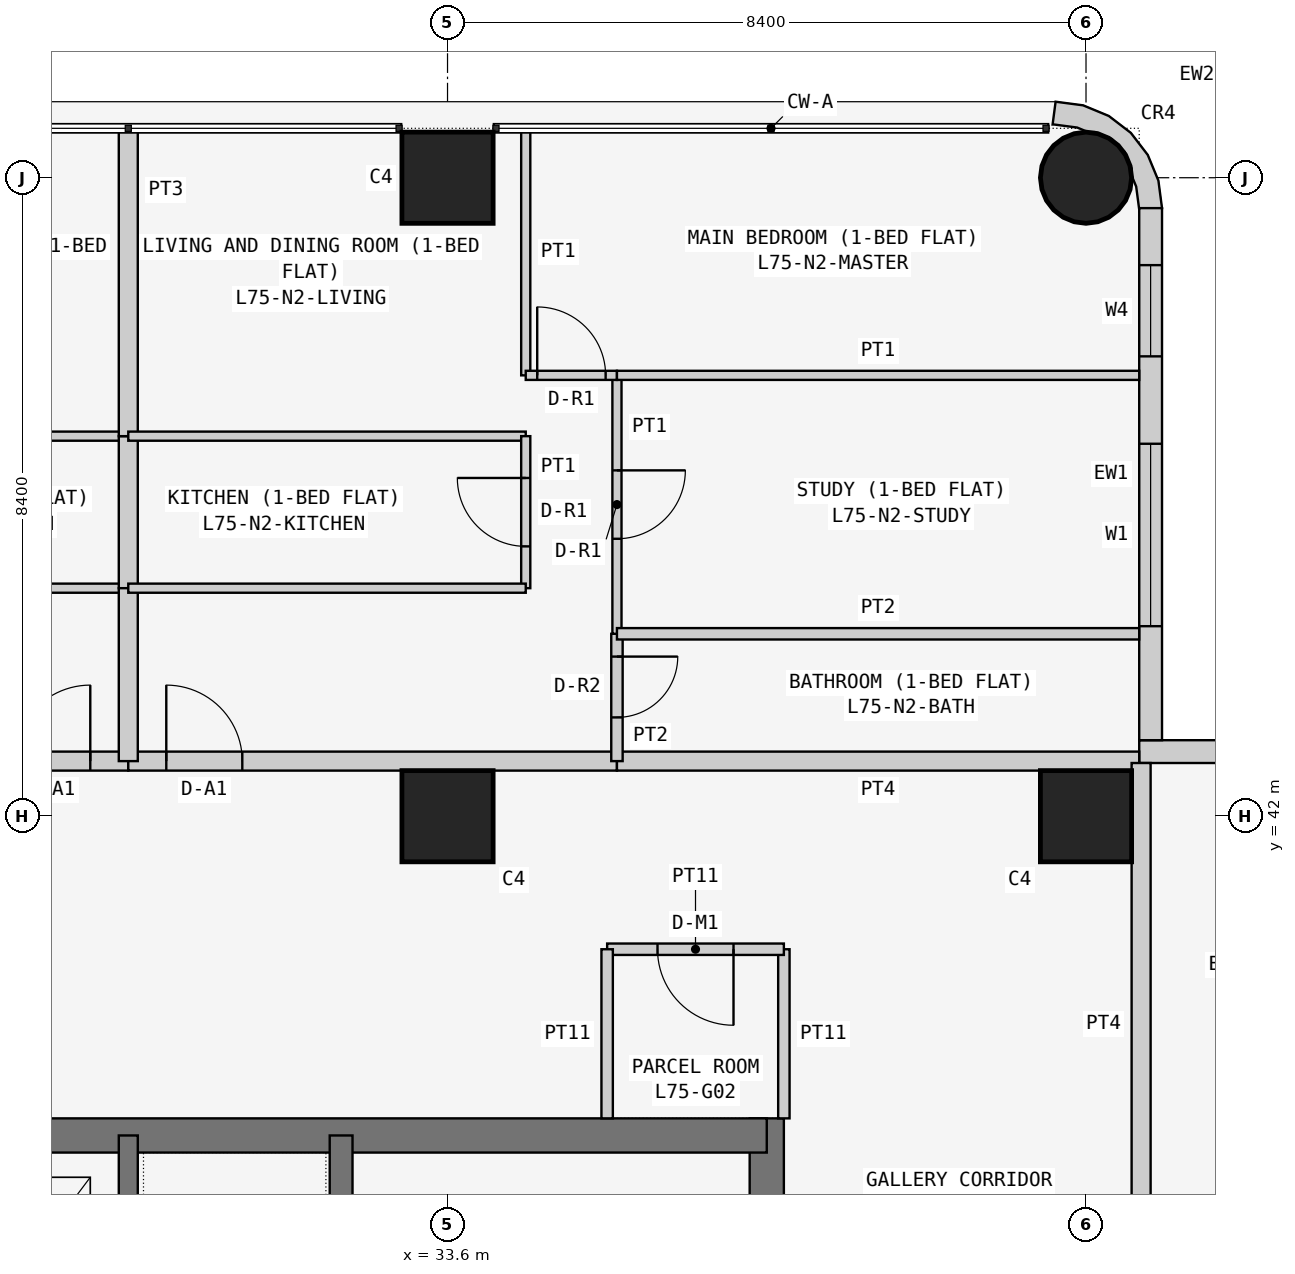
"""IFC4 building model, lengths in metres.
Left out: names, types, materials, properties, quantities, classifications, styles, units other than length and angle.
Written with IfcOpenShell. Run it as: python <this file> out.ifc"""

import sys

from ifc_helpers import new_model, si_unit, direction, frame, frame_2d, origin, origin_2d, place, context, subcontext, project, spatial, polyline, rectangle, circle, outline, extrude, element, fill, save


model = new_model("IFC4")
c1 = context("Model", 3, precision=1e-05, world=origin(), true_north=direction((0.0, 1.0)))
c2 = subcontext(c1, "Body", "Model", "MODEL_VIEW")
j1 = project(units=[si_unit("LENGTHUNIT", "METRE"), si_unit("PLANEANGLEUNIT", "RADIAN")], contexts=[c1])
p1 = place(None, origin())
s1 = spatial("IfcSite", under=j1, at=p1, CompositionType="ELEMENT")
p2 = place(p1, origin())
s2 = spatial("IfcBuilding", under=s1, at=p2, CompositionType="ELEMENT")
p3 = place(p2, frame((0.0, 0.0, 286.5)))
s3 = spatial("IfcBuildingStorey", under=s2, at=p3, CompositionType="ELEMENT", Elevation=286.5)
for number, where, z_axis, x_axis in (
    (1, (33.6, 42.0, 0.0), (0.0, 0.0, 1.0), (1.0, 0.0, 0.0)),
    (2, (33.6, 50.4, 0.0), (0.0, 0.0, 1.0), (1.0, 0.0, 0.0)),
    (3, (42.0, 42.0, 0.0), (0.0, 0.0, 1.0), (1.0, 0.0, 0.0)),
):
    element("IfcColumn", number, at=place(p3, frame(where, z_axis=z_axis, x_axis=x_axis)), inside=s3, PredefinedType="COLUMN", context=c2, shape_type="SweptSolid", body=[
        extrude(rectangle(XDim=1.2, YDim=1.2, at=origin_2d()), origin(), (0.0, 0.0, 1.0), 3.6),
    ])
p4 = place(p3, frame((42.0, 50.4, 0.0), z_axis=(0.0, 0.0, 1.0), x_axis=(1.0, 0.0, 0.0)))
e4 = element("IfcColumn", 4, at=p4, inside=s3, PredefinedType="COLUMN", context=c2, shape_type="SweptSolid", body=[
    extrude(circle(Radius=0.6, at=origin_2d()), origin(), (0.0, 0.0, 1.0), 3.6),
])
p5 = place(p3, frame((37.8, 21.0, 0.0), z_axis=(0.0, 0.0, 1.0), x_axis=(0.0, 1.0, 0.0)))
e5 = element("IfcWall", 5, at=p5, inside=s3, PredefinedType="SHEAR", context=c2, shape_type="SweptSolid", body=[
    extrude(rectangle(XDim=17.025, YDim=0.45, at=frame_2d((8.512, 0.0))), origin(), (0.0, 0.0, 1.0), 3.6),
])
p6 = place(p5, frame((5.2, 0.0, 0.0)))
e6 = element("IfcOpeningElement", 6, at=p6, cuts=e5, PredefinedType="OPENING", context=c2, shape_type="SweptSolid", body=[
    extrude(rectangle(XDim=1.2, YDim=2.1, at=frame_2d((0.6, 1.05))), frame((0.0, 0.235, 0.0), z_axis=(0.0, -1.0, 0.0), x_axis=(1.0, 0.0, 0.0)), (0.0, 0.0, 1.0), 0.47),
])
p7 = place(p3, frame((37.8, 37.8, 0.0), z_axis=(0.0, 0.0, 1.0), x_axis=(-1.0, 0.0, 0.0)))
e7 = element("IfcWall", 7, at=p7, inside=s3, PredefinedType="SHEAR", context=c2, shape_type="SweptSolid", body=[
    extrude(rectangle(XDim=17.025, YDim=0.45, at=frame_2d((8.513, 0.0))), origin(), (0.0, 0.0, 1.0), 3.6),
])
p8 = place(p3, frame((32.2, 29.25, 0.0), z_axis=(0.0, 0.0, 1.0), x_axis=(0.0, 1.0, 0.0)))
e8 = element("IfcWall", 8, at=p8, inside=s3, PredefinedType="SHEAR", context=c2, shape_type="SweptSolid", body=[
    extrude(rectangle(XDim=8.55, YDim=0.3, at=frame_2d((4.275, 0.0))), origin(), (0.0, 0.0, 1.0), 3.6),
])
p9 = place(p3, frame((29.4, 34.6, 0.0), z_axis=(0.0, 0.0, 1.0), x_axis=(0.0, 1.0, 0.0)))
e9 = element("IfcWall", 9, at=p9, inside=s3, PredefinedType="SHEAR", context=c2, shape_type="SweptSolid", body=[
    extrude(rectangle(XDim=3.2, YDim=0.25, at=frame_2d((1.6, 0.0))), origin(), (0.0, 0.0, 1.0), 3.6),
])
p10 = place(p3, frame((50.0, 42.85, 0.0), z_axis=(0.0, 0.0, 1.0), x_axis=(-1.0, 0.0, 0.0)))
e10 = element("IfcWall", 10, at=p10, inside=s3, PredefinedType="SOLIDWALL", context=c2, shape_type="SweptSolid", body=[
    extrude(rectangle(XDim=7.3, YDim=0.3, at=frame_2d((3.65, 0.0))), origin(), (0.0, 0.0, 1.0), 3.45),
])
p11 = place(p10, frame((3.1, 0.0, 0.9)))
e11 = element("IfcOpeningElement", 11, at=p11, cuts=e10, PredefinedType="OPENING", context=c2, shape_type="SweptSolid", body=[
    extrude(rectangle(XDim=2.4, YDim=1.5, at=frame_2d((1.2, 0.75))), frame((0.0, 0.16, 0.0), z_axis=(0.0, -1.0, 0.0), x_axis=(1.0, 0.0, 0.0)), (0.0, 0.0, 1.0), 0.32),
])
p12 = place(p10, frame((0.75, 0.0, 0.9)))
e12 = element("IfcOpeningElement", 12, at=p12, cuts=e10, PredefinedType="OPENING", context=c2, shape_type="SweptSolid", body=[
    extrude(rectangle(XDim=1.2, YDim=1.5, at=frame_2d((0.6, 0.75))), frame((0.0, 0.16, 0.0), z_axis=(0.0, -1.0, 0.0), x_axis=(1.0, 0.0, 0.0)), (0.0, 0.0, 1.0), 0.32),
])
p13 = place(p3, frame((42.85, 43.0, 0.0), z_axis=(0.0, 0.0, 1.0), x_axis=(0.0, 1.0, 0.0)))
e13 = element("IfcWall", 13, at=p13, inside=s3, PredefinedType="SOLIDWALL", context=c2, shape_type="SweptSolid", body=[
    extrude(rectangle(XDim=7.0, YDim=0.3, at=frame_2d((3.5, 0.0))), origin(), (0.0, 0.0, 1.0), 3.45),
])
p14 = place(p13, frame((1.5, 0.0, 0.9)))
e14 = element("IfcOpeningElement", 14, at=p14, cuts=e13, PredefinedType="OPENING", context=c2, shape_type="SweptSolid", body=[
    extrude(rectangle(XDim=2.4, YDim=1.5, at=frame_2d((1.2, 0.75))), frame((0.0, 0.16, 0.0), z_axis=(0.0, -1.0, 0.0), x_axis=(1.0, 0.0, 0.0)), (0.0, 0.0, 1.0), 0.32),
])
p15 = place(p13, frame((5.05, 0.0, 0.9)))
e15 = element("IfcOpeningElement", 15, at=p15, cuts=e13, PredefinedType="OPENING", context=c2, shape_type="SweptSolid", body=[
    extrude(rectangle(XDim=1.2, YDim=1.5, at=frame_2d((0.6, 0.75))), frame((0.0, 0.16, 0.0), z_axis=(0.0, -1.0, 0.0), x_axis=(1.0, 0.0, 0.0)), (0.0, 0.0, 1.0), 0.32),
])
p16 = place(p3, frame((42.576, 50.038, 0.0), z_axis=(0.0, 0.0, 1.0), x_axis=(0.707106781187, 0.707106781187, 0.0)))
e16 = element("IfcWall", 16, at=p16, inside=s3, PredefinedType="SOLIDWALL", context=c2, shape_type="SweptSolid", body=[
    extrude(outline(polyline([(0.233, 0.114), (0.047, -0.129), (0.033, -0.143), (0.273, -0.327), (0.495, -0.037), (0.635, 0.3), (0.683, 0.663), (0.635, 1.025), (0.495, 1.363), (0.273, 1.653), (0.033, 1.469), (0.047, 1.455), (0.233, 1.212), (0.292, 1.069), (0.358, 1.003), (0.449, 0.782), (0.449, 0.543), (0.358, 0.322), (0.292, 0.257), (0.233, 0.114)])), origin(), (0.0, 0.0, 1.0), 3.45),
])
p17 = place(p3, frame((38.025, 38.025, 0.0), z_axis=(0.0, 0.0, 1.0), x_axis=(0.0, 1.0, 0.0)))
e17 = element("IfcWall", 17, at=p17, inside=s3, PredefinedType="PARTITIONING", context=c2, shape_type="SweptSolid", body=[
    extrude(rectangle(XDim=2.225, YDim=0.15, at=frame_2d((1.113, 0.0))), origin(), (0.0, 0.0, 1.0), 3.45),
])
p18 = place(p3, frame((38.025, 40.25, 0.0), z_axis=(0.0, 0.0, 1.0), x_axis=(-1.0, 0.0, 0.0)))
e18 = element("IfcWall", 18, at=p18, inside=s3, PredefinedType="PARTITIONING", context=c2, shape_type="SweptSolid", body=[
    extrude(rectangle(XDim=2.325, YDim=0.15, at=frame_2d((1.163, 0.0))), origin(), (0.0, 0.0, 1.0), 3.45),
])
p19 = place(p18, frame((0.663, 0.0, 0.0)))
e19 = element("IfcOpeningElement", 19, at=p19, cuts=e18, PredefinedType="OPENING", context=c2, shape_type="SweptSolid", body=[
    extrude(rectangle(XDim=1.0, YDim=2.1, at=frame_2d((0.5, 1.05))), frame((0.0, 0.085, 0.0), z_axis=(0.0, -1.0, 0.0), x_axis=(1.0, 0.0, 0.0)), (0.0, 0.0, 1.0), 0.17),
])
p20 = place(p3, frame((35.7, 40.25, 0.0), z_axis=(0.0, 0.0, 1.0), x_axis=(0.0, -1.0, 0.0)))
e20 = element("IfcWall", 20, at=p20, inside=s3, PredefinedType="PARTITIONING", context=c2, shape_type="SweptSolid", body=[
    extrude(rectangle(XDim=2.225, YDim=0.15, at=frame_2d((1.113, 0.0))), origin(), (0.0, 0.0, 1.0), 3.45),
])
p21 = place(p3, frame((22.971, 42.725, 0.0), z_axis=(0.0, 0.0, 1.0), x_axis=(1.0, 0.0, 0.0)))
e21 = element("IfcWall", 21, at=p21, inside=s3, PredefinedType="PARTITIONING", context=c2, shape_type="SweptSolid", body=[
    extrude(rectangle(XDim=6.429, YDim=0.25, at=frame_2d((3.214, 0.0))), origin(), (0.0, 0.0, 1.0), 3.45),
])
p22 = place(p21, frame((4.929, 0.0, 0.0)))
e22 = element("IfcOpeningElement", 22, at=p22, cuts=e21, PredefinedType="OPENING", context=c2, shape_type="SweptSolid", body=[
    extrude(rectangle(XDim=1.0, YDim=2.1, at=frame_2d((0.5, 1.05))), frame((0.0, 0.135, 0.0), z_axis=(0.0, -1.0, 0.0), x_axis=(1.0, 0.0, 0.0)), (0.0, 0.0, 1.0), 0.27),
])
p23 = place(p3, frame((29.4, 42.725, 0.0), z_axis=(0.0, 0.0, 1.0), x_axis=(1.0, 0.0, 0.0)))
e23 = element("IfcWall", 23, at=p23, inside=s3, PredefinedType="PARTITIONING", context=c2, shape_type="SweptSolid", body=[
    extrude(rectangle(XDim=6.429, YDim=0.25, at=frame_2d((3.215, 0.0))), origin(), (0.0, 0.0, 1.0), 3.45),
])
p24 = place(p23, frame((0.5, 0.0, 0.0)))
e24 = element("IfcOpeningElement", 24, at=p24, cuts=e23, PredefinedType="OPENING", context=c2, shape_type="SweptSolid", body=[
    extrude(rectangle(XDim=1.0, YDim=2.1, at=frame_2d((0.5, 1.05))), frame((0.0, 0.135, 0.0), z_axis=(0.0, -1.0, 0.0), x_axis=(1.0, 0.0, 0.0)), (0.0, 0.0, 1.0), 0.27),
])
for number, where, z_axis, x_axis in (
    (25, (35.829, 42.725, 0.0), (0.0, 0.0, 1.0), (1.0, 0.0, 0.0)),
    (26, (42.725, 42.7, 0.0), (0.0, 0.0, 1.0), (0.0, -1.0, 0.0)),
):
    element("IfcWall", number, at=place(p3, frame(where, z_axis=z_axis, x_axis=x_axis)), inside=s3, PredefinedType="PARTITIONING", context=c2, shape_type="SweptSolid", body=[
        extrude(rectangle(XDim=6.871, YDim=0.25, at=frame_2d((3.436, 0.0))), origin(), (0.0, 0.0, 1.0), 3.45),
    ])
for number, where, z_axis, x_axis in (
    (27, (29.4, 47.0, 0.0), (0.0, 0.0, 1.0), (-1.0, 0.0, 0.0)),
    (28, (24.171, 45.0, 0.0), (0.0, 0.0, 1.0), (1.0, 0.0, 0.0)),
):
    element("IfcWall", number, at=place(p3, frame(where, z_axis=z_axis, x_axis=x_axis)), inside=s3, PredefinedType="PARTITIONING", context=c2, shape_type="SweptSolid", body=[
        extrude(rectangle(XDim=5.229, YDim=0.12, at=frame_2d((2.615, 0.0))), origin(), (0.0, 0.0, 1.0), 3.45),
    ])
p25 = place(p3, frame((29.4, 45.0, 0.0), z_axis=(0.0, 0.0, 1.0), x_axis=(0.0, 1.0, 0.0)))
e29 = element("IfcWall", 29, at=p25, inside=s3, PredefinedType="PARTITIONING", context=c2, shape_type="SweptSolid", body=[
    extrude(rectangle(XDim=2.0, YDim=0.25, at=frame_2d((1.0, 0.0))), origin(), (0.0, 0.0, 1.0), 2.848),
])
p26 = place(p3, frame((29.4, 45.0, 0.0), z_axis=(0.0, 0.0, 1.0), x_axis=(0.0, -1.0, 0.0)))
e30 = element("IfcWall", 30, at=p26, inside=s3, PredefinedType="PARTITIONING", context=c2, shape_type="SweptSolid", body=[
    extrude(rectangle(XDim=2.275, YDim=0.25, at=frame_2d((1.137, 0.0))), origin(), (0.0, 0.0, 1.0), 2.848),
])
p27 = place(p3, frame((29.4, 51.05, 0.0), z_axis=(0.0, 0.0, 1.0), x_axis=(0.0, -1.0, 0.0)))
e31 = element("IfcWall", 31, at=p27, inside=s3, PredefinedType="PARTITIONING", context=c2, shape_type="SweptSolid", body=[
    extrude(rectangle(XDim=4.05, YDim=0.25, at=frame_2d((2.025, 0.0))), origin(), (0.0, 0.0, 1.0), 2.848),
])
p28 = place(p3, frame((29.4, 47.0, 0.0), z_axis=(0.0, 0.0, 1.0), x_axis=(1.0, 0.0, 0.0)))
e32 = element("IfcWall", 32, at=p28, inside=s3, PredefinedType="PARTITIONING", context=c2, shape_type="SweptSolid", body=[
    extrude(rectangle(XDim=5.229, YDim=0.12, at=frame_2d((2.615, 0.0))), origin(), (0.0, 0.0, 1.0), 3.45),
])
p29 = place(p3, frame((34.629, 47.0, 0.0), z_axis=(0.0, 0.0, 1.0), x_axis=(0.0, -1.0, 0.0)))
e33 = element("IfcWall", 33, at=p29, inside=s3, PredefinedType="PARTITIONING", context=c2, shape_type="SweptSolid", body=[
    extrude(rectangle(XDim=2.0, YDim=0.12, at=frame_2d((1.0, 0.0))), origin(), (0.0, 0.0, 1.0), 3.45),
])
p30 = place(p29, frame((0.55, 0.0, 0.0)))
e34 = element("IfcOpeningElement", 34, at=p30, cuts=e33, PredefinedType="OPENING", context=c2, shape_type="SweptSolid", body=[
    extrude(rectangle(XDim=0.9, YDim=2.1, at=frame_2d((0.45, 1.05))), frame((0.0, 0.07, 0.0), z_axis=(0.0, -1.0, 0.0), x_axis=(1.0, 0.0, 0.0)), (0.0, 0.0, 1.0), 0.14),
])
p31 = place(p3, frame((34.629, 45.0, 0.0), z_axis=(0.0, 0.0, 1.0), x_axis=(-1.0, 0.0, 0.0)))
e35 = element("IfcWall", 35, at=p31, inside=s3, PredefinedType="PARTITIONING", context=c2, shape_type="SweptSolid", body=[
    extrude(rectangle(XDim=5.229, YDim=0.12, at=frame_2d((2.615, 0.0))), origin(), (0.0, 0.0, 1.0), 3.45),
])
p32 = place(p3, frame((35.829, 44.4, 0.0), z_axis=(0.0, 0.0, 1.0), x_axis=(0.0, -1.0, 0.0)))
e36 = element("IfcWall", 36, at=p32, inside=s3, PredefinedType="PARTITIONING", context=c2, shape_type="SweptSolid", body=[
    extrude(rectangle(XDim=1.675, YDim=0.15, at=frame_2d((0.837, 0.0))), origin(), (0.0, 0.0, 1.0), 3.45),
])
p33 = place(p32, frame((0.3, 0.0, 0.0)))
e37 = element("IfcOpeningElement", 37, at=p33, cuts=e36, PredefinedType="OPENING", context=c2, shape_type="SweptSolid", body=[
    extrude(rectangle(XDim=0.8, YDim=2.1, at=frame_2d((0.4, 1.05))), frame((0.0, 0.085, 0.0), z_axis=(0.0, -1.0, 0.0), x_axis=(1.0, 0.0, 0.0)), (0.0, 0.0, 1.0), 0.17),
])
p34 = place(p3, frame((35.829, 47.8, 0.0), z_axis=(0.0, 0.0, 1.0), x_axis=(0.0, -1.0, 0.0)))
e38 = element("IfcWall", 38, at=p34, inside=s3, PredefinedType="PARTITIONING", context=c2, shape_type="SweptSolid", body=[
    extrude(rectangle(XDim=3.4, YDim=0.12, at=frame_2d((1.7, 0.0))), origin(), (0.0, 0.0, 1.0), 3.45),
])
p35 = place(p34, frame((1.25, 0.0, 0.0)))
e39 = element("IfcOpeningElement", 39, at=p35, cuts=e38, PredefinedType="OPENING", context=c2, shape_type="SweptSolid", body=[
    extrude(rectangle(XDim=0.9, YDim=2.1, at=frame_2d((0.45, 1.05))), frame((0.0, 0.07, 0.0), z_axis=(0.0, -1.0, 0.0), x_axis=(1.0, 0.0, 0.0)), (0.0, 0.0, 1.0), 0.14),
])
p36 = place(p3, frame((34.629, 51.05, 0.0), z_axis=(0.0, 0.0, 1.0), x_axis=(0.0, -1.0, 0.0)))
e40 = element("IfcWall", 40, at=p36, inside=s3, PredefinedType="PARTITIONING", context=c2, shape_type="SweptSolid", body=[
    extrude(rectangle(XDim=3.25, YDim=0.12, at=frame_2d((1.625, 0.0))), origin(), (0.0, 0.0, 1.0), 3.45),
])
p37 = place(p3, frame((34.629, 47.8, 0.0), z_axis=(0.0, 0.0, 1.0), x_axis=(1.0, 0.0, 0.0)))
e41 = element("IfcWall", 41, at=p37, inside=s3, PredefinedType="PARTITIONING", context=c2, shape_type="SweptSolid", body=[
    extrude(rectangle(XDim=1.2, YDim=0.12, at=frame_2d((0.6, 0.0))), origin(), (0.0, 0.0, 1.0), 3.45),
])
p38 = place(p37, frame((0.151, 0.0, 0.0)))
e42 = element("IfcOpeningElement", 42, at=p38, cuts=e41, PredefinedType="OPENING", context=c2, shape_type="SweptSolid", body=[
    extrude(rectangle(XDim=0.9, YDim=2.1, at=frame_2d((0.45, 1.05))), frame((0.0, 0.07, 0.0), z_axis=(0.0, -1.0, 0.0), x_axis=(1.0, 0.0, 0.0)), (0.0, 0.0, 1.0), 0.14),
])
p39 = place(p3, frame((35.829, 44.4, 0.0), z_axis=(0.0, 0.0, 1.0), x_axis=(1.0, 0.0, 0.0)))
e43 = element("IfcWall", 43, at=p39, inside=s3, PredefinedType="PARTITIONING", context=c2, shape_type="SweptSolid", body=[
    extrude(rectangle(XDim=6.871, YDim=0.15, at=frame_2d((3.436, 0.0))), origin(), (0.0, 0.0, 1.0), 3.45),
])
p40 = place(p3, frame((35.829, 47.8, 0.0), z_axis=(0.0, 0.0, 1.0), x_axis=(1.0, 0.0, 0.0)))
e44 = element("IfcWall", 44, at=p40, inside=s3, PredefinedType="PARTITIONING", context=c2, shape_type="SweptSolid", body=[
    extrude(rectangle(XDim=6.871, YDim=0.12, at=frame_2d((3.436, 0.0))), origin(), (0.0, 0.0, 1.0), 3.45),
])
p41 = place(p14, origin())
e45 = element("IfcWindow", 45, at=p41, inside=s3, PartitioningType="SINGLE_PANEL", PredefinedType="WINDOW", context=c2, shape_type="SweptSolid", body=[
    extrude(rectangle(XDim=2.4, YDim=1.5, at=frame_2d((1.2, 0.75))), frame((0.0, 0.03, 0.0), z_axis=(0.0, -1.0, 0.0), x_axis=(1.0, 0.0, 0.0)), (0.0, 0.0, 1.0), 0.06),
])
fill(e14, e45)
p42 = place(p15, origin())
e46 = element("IfcWindow", 46, at=p42, inside=s3, PartitioningType="SINGLE_PANEL", PredefinedType="WINDOW", context=c2, shape_type="SweptSolid", body=[
    extrude(rectangle(XDim=1.2, YDim=1.5, at=frame_2d((0.6, 0.75))), frame((0.0, 0.03, 0.0), z_axis=(0.0, -1.0, 0.0), x_axis=(1.0, 0.0, 0.0)), (0.0, 0.0, 1.0), 0.06),
])
fill(e15, e46)
p43 = place(p19, origin())
e47 = element("IfcDoor", 47, at=p43, inside=s3, OperationType="SINGLE_SWING_LEFT", PredefinedType="DOOR", context=c2, shape_type="SweptSolid", body=[
    extrude(rectangle(XDim=1.0, YDim=2.1, at=frame_2d((0.5, 1.05))), frame((0.0, 0.025, 0.0), z_axis=(0.0, -1.0, 0.0), x_axis=(1.0, 0.0, 0.0)), (0.0, 0.0, 1.0), 0.05),
])
fill(e19, e47)
p44 = place(p22, origin())
e48 = element("IfcDoor", 48, at=p44, inside=s3, OperationType="SINGLE_SWING_RIGHT", PredefinedType="DOOR", context=c2, shape_type="SweptSolid", body=[
    extrude(rectangle(XDim=1.0, YDim=2.1, at=frame_2d((0.5, 1.05))), frame((0.0, 0.025, 0.0), z_axis=(0.0, -1.0, 0.0), x_axis=(1.0, 0.0, 0.0)), (0.0, 0.0, 1.0), 0.05),
])
fill(e22, e48)
p45 = place(p24, origin())
e49 = element("IfcDoor", 49, at=p45, inside=s3, OperationType="SINGLE_SWING_LEFT", PredefinedType="DOOR", context=c2, shape_type="SweptSolid", body=[
    extrude(rectangle(XDim=1.0, YDim=2.1, at=frame_2d((0.5, 1.05))), frame((0.0, 0.025, 0.0), z_axis=(0.0, -1.0, 0.0), x_axis=(1.0, 0.0, 0.0)), (0.0, 0.0, 1.0), 0.05),
])
fill(e24, e49)
p46 = place(p30, frame((0.9, 0.0, 0.0), z_axis=(0.0, 0.0, 1.0), x_axis=(-1.0, 0.0, 0.0)))
e50 = element("IfcDoor", 50, at=p46, inside=s3, OperationType="SINGLE_SWING_RIGHT", PredefinedType="DOOR", context=c2, shape_type="SweptSolid", body=[
    extrude(rectangle(XDim=0.9, YDim=2.1, at=frame_2d((0.45, 1.05))), frame((0.0, 0.025, 0.0), z_axis=(0.0, -1.0, 0.0), x_axis=(1.0, 0.0, 0.0)), (0.0, 0.0, 1.0), 0.05),
])
fill(e34, e50)
p47 = place(p33, origin())
e51 = element("IfcDoor", 51, at=p47, inside=s3, OperationType="SINGLE_SWING_LEFT", PredefinedType="DOOR", context=c2, shape_type="SweptSolid", body=[
    extrude(rectangle(XDim=0.8, YDim=2.1, at=frame_2d((0.4, 1.05))), frame((0.0, 0.025, 0.0), z_axis=(0.0, -1.0, 0.0), x_axis=(1.0, 0.0, 0.0)), (0.0, 0.0, 1.0), 0.05),
])
fill(e37, e51)
p48 = place(p35, origin())
e52 = element("IfcDoor", 52, at=p48, inside=s3, OperationType="SINGLE_SWING_LEFT", PredefinedType="DOOR", context=c2, shape_type="SweptSolid", body=[
    extrude(rectangle(XDim=0.9, YDim=2.1, at=frame_2d((0.45, 1.05))), frame((0.0, 0.025, 0.0), z_axis=(0.0, -1.0, 0.0), x_axis=(1.0, 0.0, 0.0)), (0.0, 0.0, 1.0), 0.05),
])
fill(e39, e52)
p49 = place(p38, origin())
e53 = element("IfcDoor", 53, at=p49, inside=s3, OperationType="SINGLE_SWING_LEFT", PredefinedType="DOOR", context=c2, shape_type="SweptSolid", body=[
    extrude(rectangle(XDim=0.9, YDim=2.1, at=frame_2d((0.45, 1.05))), frame((0.0, 0.025, 0.0), z_axis=(0.0, -1.0, 0.0), x_axis=(1.0, 0.0, 0.0)), (0.0, 0.0, 1.0), 0.05),
])
fill(e42, e53)
save(model, sys.argv[1])
